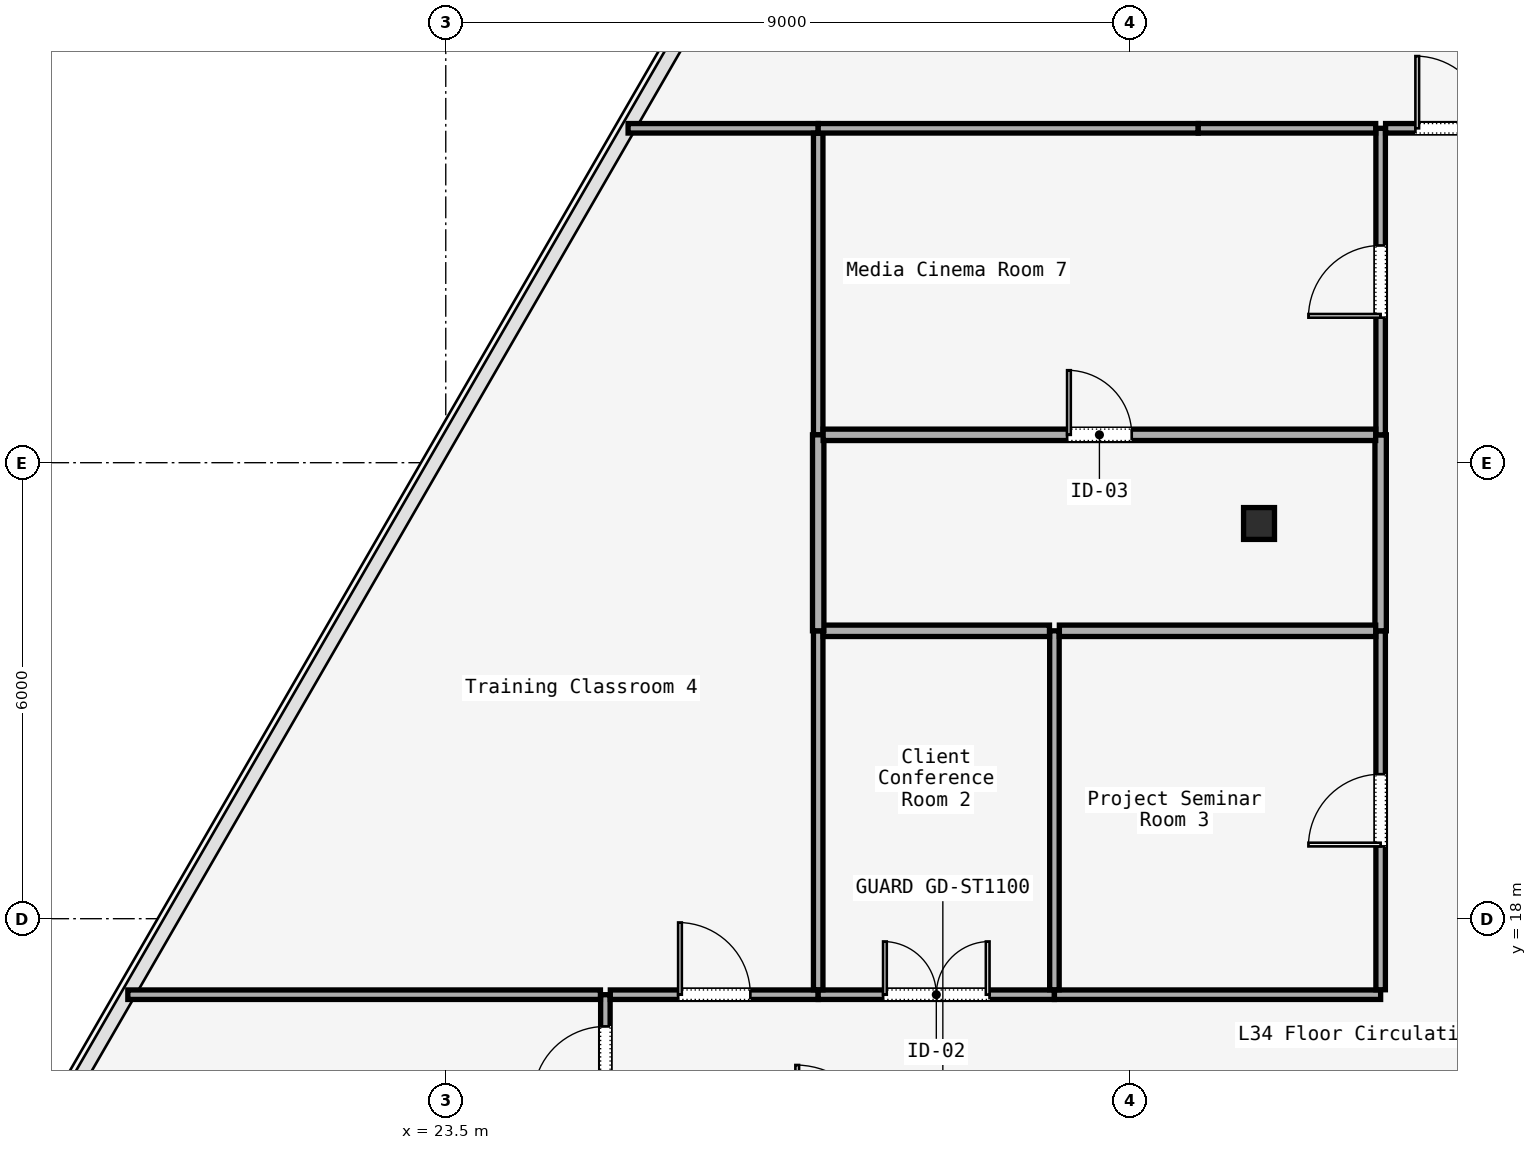
"""IFC4 building model, lengths in metres.
Left out: names, types, materials, properties, quantities, classifications, styles, units other than length and angle.
Written with IfcOpenShell. Run it as: python <this file> out.ifc"""

import sys

from ifc_helpers import new_model, si_unit, direction, frame, frame_2d, origin, origin_2d, place, context, subcontext, project, spatial, rectangle, i_section, extrude, element, fill, save


model = new_model("IFC4")
c1 = context("Model", 3, precision=1e-05, world=origin(), true_north=direction((0.0, 1.0)))
c2 = subcontext(c1, "Body", "Model", "MODEL_VIEW")
j1 = project(units=[si_unit("LENGTHUNIT", "METRE"), si_unit("PLANEANGLEUNIT", "RADIAN")], contexts=[c1])
p1 = place(None, origin())
s1 = spatial("IfcSite", under=j1, at=p1, CompositionType="ELEMENT")
p2 = place(p1, origin())
s2 = spatial("IfcBuilding", under=s1, at=p2, CompositionType="ELEMENT")
p3 = place(p2, frame((0.0, 0.0, 146.0)))
s3 = spatial("IfcBuildingStorey", under=s2, at=p3, CompositionType="ELEMENT", Elevation=146.0)
p4 = place(p3, frame((34.2, 23.2, 0.0), z_axis=(0.0, 0.0, 1.0), x_axis=(1.0, 0.0, 0.0)))
e1 = element("IfcColumn", 1, at=p4, inside=s3, PredefinedType="COLUMN", context=c2, shape_type="SweptSolid", body=[
    extrude(i_section(OverallWidth=0.407, OverallDepth=0.419, WebThickness=0.031, FlangeThickness=0.049, FilletRadius=0.015, at=origin_2d()), origin(), (0.0, 0.0, 1.0), 3.58),
])
p5 = place(p3, frame((25.6, 15.215, 0.0), z_axis=(0.0, 0.0, 1.0), x_axis=(0.0, 1.0, 0.0)))
e2 = element("IfcWall", 2, at=p5, inside=s3, PredefinedType="PARTITIONING", context=c2, shape_type="SweptSolid", body=[
    extrude(rectangle(XDim=1.785, YDim=0.125, at=frame_2d((0.893, 0.0))), origin(), (0.0, 0.0, 1.0), 3.01),
])
p6 = place(p5, frame((0.417, 0.0, 0.0)))
e3 = element("IfcOpeningElement", 3, at=p6, cuts=e2, PredefinedType="OPENING", context=c2, shape_type="SweptSolid", body=[
    extrude(rectangle(XDim=0.95, YDim=2.2, at=frame_2d((0.475, 1.1))), frame((0.0, 0.062, 0.0), z_axis=(0.0, -1.0, 0.0), x_axis=(1.0, 0.0, 0.0)), (0.0, 0.0, 1.0), 0.125),
])
p7 = place(p3, frame((25.665, 17.0, 0.0), z_axis=(0.0, 0.0, 1.0), x_axis=(1.0, 0.0, 0.0)))
e4 = element("IfcWall", 4, at=p7, inside=s3, PredefinedType="PARTITIONING", context=c2, shape_type="SweptSolid", body=[
    extrude(rectangle(XDim=2.735, YDim=0.125, at=frame_2d((1.367, 0.0))), origin(), (0.0, 0.0, 1.0), 3.01),
])
p8 = place(p7, frame((0.893, 0.0, 0.0)))
e5 = element("IfcOpeningElement", 5, at=p8, cuts=e4, PredefinedType="OPENING", context=c2, shape_type="SweptSolid", body=[
    extrude(rectangle(XDim=0.95, YDim=2.2, at=frame_2d((0.475, 1.1))), frame((0.0, 0.062, 0.0), z_axis=(0.0, -1.0, 0.0), x_axis=(1.0, 0.0, 0.0)), (0.0, 0.0, 1.0), 0.125),
])
p9 = place(p3, frame((28.4, 17.0, 0.0), z_axis=(0.0, 0.0, 1.0), x_axis=(1.0, 0.0, 0.0)))
e6 = element("IfcWall", 6, at=p9, inside=s3, PredefinedType="PARTITIONING", context=c2, shape_type="SweptSolid", body=[
    extrude(rectangle(XDim=3.108, YDim=0.125, at=frame_2d((1.554, 0.0))), origin(), (0.0, 0.0, 1.0), 3.01),
])
p10 = place(p9, frame((0.854, 0.0, 0.0)))
e7 = element("IfcOpeningElement", 7, at=p10, cuts=e6, PredefinedType="OPENING", context=c2, shape_type="SweptSolid", body=[
    extrude(rectangle(XDim=1.4, YDim=2.2, at=frame_2d((0.7, 1.1))), frame((0.0, 0.062, 0.0), z_axis=(0.0, -1.0, 0.0), x_axis=(1.0, 0.0, 0.0)), (0.0, 0.0, 1.0), 0.125),
])
p11 = place(p3, frame((31.508, 17.0, 0.0), z_axis=(0.0, 0.0, 1.0), x_axis=(1.0, 0.0, 0.0)))
e8 = element("IfcWall", 8, at=p11, inside=s3, PredefinedType="PARTITIONING", context=c2, shape_type="SweptSolid", body=[
    extrude(rectangle(XDim=4.292, YDim=0.125, at=frame_2d((2.146, 0.0))), origin(), (0.0, 0.0, 1.0), 3.01),
])
p12 = place(p3, frame((35.8, 17.065, 0.0), z_axis=(0.0, 0.0, 1.0), x_axis=(0.0, 1.0, 0.0)))
e9 = element("IfcWall", 9, at=p12, inside=s3, PredefinedType="PARTITIONING", context=c2, shape_type="SweptSolid", body=[
    extrude(rectangle(XDim=4.723, YDim=0.125, at=frame_2d((2.362, 0.0))), origin(), (0.0, 0.0, 1.0), 3.01),
])
p13 = place(p12, frame((1.886, 0.0, 0.0)))
e10 = element("IfcOpeningElement", 10, at=p13, cuts=e9, PredefinedType="OPENING", context=c2, shape_type="SweptSolid", body=[
    extrude(rectangle(XDim=0.95, YDim=2.2, at=frame_2d((0.475, 1.1))), frame((0.0, 0.062, 0.0), z_axis=(0.0, -1.0, 0.0), x_axis=(1.0, 0.0, 0.0)), (0.0, 0.0, 1.0), 0.125),
])
p14 = place(p3, frame((35.8, 21.788, 0.0), z_axis=(0.0, 0.0, 1.0), x_axis=(0.0, 1.0, 0.0)))
e11 = element("IfcWall", 11, at=p14, inside=s3, PredefinedType="PARTITIONING", context=c2, shape_type="SweptSolid", body=[
    extrude(rectangle(XDim=2.579, YDim=0.15, at=frame_2d((1.289, 0.0))), origin(), (0.0, 0.0, 1.0), 3.01),
])
p15 = place(p3, frame((35.8, 24.367, 0.0), z_axis=(0.0, 0.0, 1.0), x_axis=(0.0, 1.0, 0.0)))
e12 = element("IfcWall", 12, at=p15, inside=s3, PredefinedType="PARTITIONING", context=c2, shape_type="SweptSolid", body=[
    extrude(rectangle(XDim=4.033, YDim=0.125, at=frame_2d((2.017, 0.0))), origin(), (0.0, 0.0, 1.0), 3.01),
])
p16 = place(p15, frame((1.542, 0.0, 0.0)))
e13 = element("IfcOpeningElement", 13, at=p16, cuts=e12, PredefinedType="OPENING", context=c2, shape_type="SweptSolid", body=[
    extrude(rectangle(XDim=0.95, YDim=2.2, at=frame_2d((0.475, 1.1))), frame((0.0, 0.062, 0.0), z_axis=(0.0, -1.0, 0.0), x_axis=(1.0, 0.0, 0.0)), (0.0, 0.0, 1.0), 0.125),
])
p17 = place(p3, frame((35.865, 28.4, 0.0), z_axis=(0.0, 0.0, 1.0), x_axis=(1.0, 0.0, 0.0)))
e14 = element("IfcWall", 14, at=p17, inside=s3, PredefinedType="PARTITIONING", context=c2, shape_type="SweptSolid", body=[
    extrude(rectangle(XDim=1.735, YDim=0.125, at=frame_2d((0.868, 0.0))), origin(), (0.0, 0.0, 1.0), 3.01),
])
p18 = place(p17, frame((0.393, 0.0, 0.0)))
e15 = element("IfcOpeningElement", 15, at=p18, cuts=e14, PredefinedType="OPENING", context=c2, shape_type="SweptSolid", body=[
    extrude(rectangle(XDim=0.95, YDim=2.2, at=frame_2d((0.475, 1.1))), frame((0.0, 0.062, 0.0), z_axis=(0.0, -1.0, 0.0), x_axis=(1.0, 0.0, 0.0)), (0.0, 0.0, 1.0), 0.125),
])
p19 = place(p3, frame((19.317, 17.0, 0.0), z_axis=(0.0, 0.0, 1.0), x_axis=(1.0, 0.0, 0.0)))
e16 = element("IfcWall", 16, at=p19, inside=s3, PredefinedType="PARTITIONING", context=c2, shape_type="SweptSolid", body=[
    extrude(rectangle(XDim=6.218, YDim=0.125, at=frame_2d((3.109, 0.0))), origin(), (0.0, 0.0, 1.0), 3.01),
])
for number, where, z_axis, x_axis in (
    (17, (31.508, 21.788, 0.0), (0.0, 0.0, 1.0), (0.0, -1.0, 0.0)),
    (18, (28.4, 17.065, 0.0), (0.0, 0.0, 1.0), (0.0, 1.0, 0.0)),
):
    element("IfcWall", number, at=place(p3, frame(where, z_axis=z_axis, x_axis=x_axis)), inside=s3, PredefinedType="PARTITIONING", context=c2, shape_type="SweptSolid", body=[
        extrude(rectangle(XDim=4.723, YDim=0.125, at=frame_2d((2.362, 0.0))), origin(), (0.0, 0.0, 1.0), 3.01),
    ])
p20 = place(p3, frame((28.465, 21.788, 0.0), z_axis=(0.0, 0.0, 1.0), x_axis=(1.0, 0.0, 0.0)))
e19 = element("IfcWall", 19, at=p20, inside=s3, PredefinedType="PARTITIONING", context=c2, shape_type="SweptSolid", body=[
    extrude(rectangle(XDim=2.978, YDim=0.15, at=frame_2d((1.489, 0.0))), origin(), (0.0, 0.0, 1.0), 3.01),
])
p21 = place(p3, frame((31.573, 21.788, 0.0), z_axis=(0.0, 0.0, 1.0), x_axis=(1.0, 0.0, 0.0)))
e20 = element("IfcWall", 20, at=p21, inside=s3, PredefinedType="PARTITIONING", context=c2, shape_type="SweptSolid", body=[
    extrude(rectangle(XDim=4.162, YDim=0.15, at=frame_2d((2.081, 0.0))), origin(), (0.0, 0.0, 1.0), 3.01),
])
p22 = place(p3, frame((25.899, 28.4, 0.0), z_axis=(0.0, 0.0, 1.0), x_axis=(1.0, 0.0, 0.0)))
e21 = element("IfcWall", 21, at=p22, inside=s3, PredefinedType="PARTITIONING", context=c2, shape_type="SweptSolid", body=[
    extrude(rectangle(XDim=2.501, YDim=0.125, at=frame_2d((1.25, 0.0))), origin(), (0.0, 0.0, 1.0), 3.01),
])
p23 = place(p3, frame((28.4, 28.335, 0.0), z_axis=(0.0, 0.0, 1.0), x_axis=(0.0, -1.0, 0.0)))
e22 = element("IfcWall", 22, at=p23, inside=s3, PredefinedType="PARTITIONING", context=c2, shape_type="SweptSolid", body=[
    extrude(rectangle(XDim=3.968, YDim=0.125, at=frame_2d((1.984, 0.0))), origin(), (0.0, 0.0, 1.0), 3.01),
])
p24 = place(p3, frame((28.4, 24.367, 0.0), z_axis=(0.0, 0.0, 1.0), x_axis=(0.0, -1.0, 0.0)))
e23 = element("IfcWall", 23, at=p24, inside=s3, PredefinedType="PARTITIONING", context=c2, shape_type="SweptSolid", body=[
    extrude(rectangle(XDim=2.579, YDim=0.15, at=frame_2d((1.289, 0.0))), origin(), (0.0, 0.0, 1.0), 3.01),
])
p25 = place(p3, frame((28.465, 24.367, 0.0), z_axis=(0.0, 0.0, 1.0), x_axis=(1.0, 0.0, 0.0)))
e24 = element("IfcWall", 24, at=p25, inside=s3, PredefinedType="PARTITIONING", context=c2, shape_type="SweptSolid", body=[
    extrude(rectangle(XDim=7.27, YDim=0.15, at=frame_2d((3.635, 0.0))), origin(), (0.0, 0.0, 1.0), 3.01),
])
p26 = place(p25, frame((3.21, 0.0, 0.0)))
e25 = element("IfcOpeningElement", 25, at=p26, cuts=e24, PredefinedType="OPENING", context=c2, shape_type="SweptSolid", body=[
    extrude(rectangle(XDim=0.85, YDim=2.15, at=frame_2d((0.425, 1.075))), frame((0.0, 0.075, 0.0), z_axis=(0.0, -1.0, 0.0), x_axis=(1.0, 0.0, 0.0)), (0.0, 0.0, 1.0), 0.15),
])
p27 = place(p3, frame((28.4, 28.4, 0.0), z_axis=(0.0, 0.0, 1.0), x_axis=(1.0, 0.0, 0.0)))
e26 = element("IfcWall", 26, at=p27, inside=s3, PredefinedType="PARTITIONING", context=c2, shape_type="SweptSolid", body=[
    extrude(rectangle(XDim=5.0, YDim=0.125, at=frame_2d((2.5, 0.0))), origin(), (0.0, 0.0, 1.0), 3.01),
])
p28 = place(p3, frame((33.4, 28.4, 0.0), z_axis=(0.0, 0.0, 1.0), x_axis=(1.0, 0.0, 0.0)))
e27 = element("IfcWall", 27, at=p28, inside=s3, PredefinedType="PARTITIONING", context=c2, shape_type="SweptSolid", body=[
    extrude(rectangle(XDim=2.335, YDim=0.125, at=frame_2d((1.167, 0.0))), origin(), (0.0, 0.0, 1.0), 3.01),
])
p29 = place(p6, origin())
e28 = element("IfcDoor", 28, at=p29, inside=s3, OperationType="SINGLE_SWING_LEFT", PredefinedType="DOOR", context=c2, shape_type="SweptSolid", body=[
    extrude(rectangle(XDim=0.95, YDim=2.2, at=frame_2d((0.475, 1.1))), frame((0.0, 0.025, 0.0), z_axis=(0.0, -1.0, 0.0), x_axis=(1.0, 0.0, 0.0)), (0.0, 0.0, 1.0), 0.05),
])
fill(e3, e28)
p30 = place(p10, origin())
e29 = element("IfcDoor", 29, at=p30, inside=s3, OperationType="SINGLE_SWING_LEFT", PredefinedType="DOOR", context=c2, shape_type="SweptSolid", body=[
    extrude(rectangle(XDim=1.4, YDim=2.2, at=frame_2d((0.7, 1.1))), frame((0.0, 0.025, 0.0), z_axis=(0.0, -1.0, 0.0), x_axis=(1.0, 0.0, 0.0)), (0.0, 0.0, 1.0), 0.05),
])
fill(e7, e29)
p31 = place(p13, origin())
e30 = element("IfcDoor", 30, at=p31, inside=s3, OperationType="SINGLE_SWING_RIGHT", PredefinedType="DOOR", context=c2, shape_type="SweptSolid", body=[
    extrude(rectangle(XDim=0.95, YDim=2.2, at=frame_2d((0.475, 1.1))), frame((0.0, 0.025, 0.0), z_axis=(0.0, -1.0, 0.0), x_axis=(1.0, 0.0, 0.0)), (0.0, 0.0, 1.0), 0.05),
])
fill(e10, e30)
p32 = place(p8, origin())
e31 = element("IfcDoor", 31, at=p32, inside=s3, OperationType="SINGLE_SWING_LEFT", PredefinedType="DOOR", context=c2, shape_type="SweptSolid", body=[
    extrude(rectangle(XDim=0.95, YDim=2.2, at=frame_2d((0.475, 1.1))), frame((0.0, 0.025, 0.0), z_axis=(0.0, -1.0, 0.0), x_axis=(1.0, 0.0, 0.0)), (0.0, 0.0, 1.0), 0.05),
])
fill(e5, e31)
p33 = place(p26, origin())
e32 = element("IfcDoor", 32, at=p33, inside=s3, OperationType="SINGLE_SWING_LEFT", PredefinedType="DOOR", context=c2, shape_type="SweptSolid", body=[
    extrude(rectangle(XDim=0.85, YDim=2.15, at=frame_2d((0.425, 1.075))), frame((0.0, 0.025, 0.0), z_axis=(0.0, -1.0, 0.0), x_axis=(1.0, 0.0, 0.0)), (0.0, 0.0, 1.0), 0.05),
])
fill(e25, e32)
p34 = place(p16, origin())
e33 = element("IfcDoor", 33, at=p34, inside=s3, OperationType="SINGLE_SWING_LEFT", PredefinedType="DOOR", context=c2, shape_type="SweptSolid", body=[
    extrude(rectangle(XDim=0.95, YDim=2.2, at=frame_2d((0.475, 1.1))), frame((0.0, 0.025, 0.0), z_axis=(0.0, -1.0, 0.0), x_axis=(1.0, 0.0, 0.0)), (0.0, 0.0, 1.0), 0.05),
])
fill(e13, e33)
p35 = place(p18, origin())
e34 = element("IfcDoor", 34, at=p35, inside=s3, OperationType="SINGLE_SWING_RIGHT", PredefinedType="DOOR", context=c2, shape_type="SweptSolid", body=[
    extrude(rectangle(XDim=0.95, YDim=2.2, at=frame_2d((0.475, 1.1))), frame((0.0, 0.025, 0.0), z_axis=(0.0, -1.0, 0.0), x_axis=(1.0, 0.0, 0.0)), (0.0, 0.0, 1.0), 0.05),
])
fill(e15, e34)
save(model, sys.argv[1])
